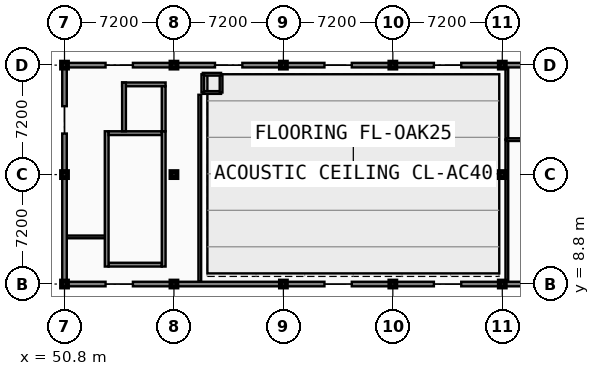
"""IFC4 building model, lengths in metres.
Left out: names, types, materials, properties, quantities, classifications, styles, units other than length and angle.
Written with IfcOpenShell. Run it as: python <this file> out.ifc"""

import sys

from ifc_helpers import new_model, si_unit, direction, frame, frame_2d, origin, origin_2d, place, context, subcontext, project, spatial, rectangle, extrude, element, fill, save


model = new_model("IFC4")
c1 = context("Model", 3, precision=1e-05, world=origin(), true_north=direction((0.0, 1.0)))
c2 = subcontext(c1, "Body", "Model", "MODEL_VIEW")
j1 = project(units=[si_unit("LENGTHUNIT", "METRE"), si_unit("PLANEANGLEUNIT", "RADIAN")], contexts=[c1])
p1 = place(None, origin())
s1 = spatial("IfcSite", under=j1, at=p1, CompositionType="ELEMENT")
p2 = place(p1, origin())
s2 = spatial("IfcBuilding", under=s1, at=p2, CompositionType="ELEMENT")
p3 = place(p2, frame((0.0, 0.0, 9.6)))
s3 = spatial("IfcBuildingStorey", under=s2, at=p3, CompositionType="ELEMENT", Elevation=9.6)
for number, where, z_axis, x_axis in (
    (1, (50.8, 8.8, 0.0), (0.0, 0.0, 1.0), (1.0, 0.0, 0.0)),
    (2, (50.8, 16.0, 0.0), (0.0, 0.0, 1.0), (1.0, 0.0, 0.0)),
    (3, (50.8, 23.2, 0.0), (0.0, 0.0, 1.0), (1.0, 0.0, 0.0)),
    (4, (58.0, 8.8, 0.0), (0.0, 0.0, 1.0), (1.0, 0.0, 0.0)),
    (5, (58.0, 16.0, 0.0), (0.0, 0.0, 1.0), (1.0, 0.0, 0.0)),
    (6, (58.0, 23.2, 0.0), (0.0, 0.0, 1.0), (1.0, 0.0, 0.0)),
    (7, (65.2, 8.8, 0.0), (0.0, 0.0, 1.0), (1.0, 0.0, 0.0)),
    (8, (65.2, 16.0, 0.0), (0.0, 0.0, 1.0), (1.0, 0.0, 0.0)),
    (9, (65.2, 23.2, 0.0), (0.0, 0.0, 1.0), (1.0, 0.0, 0.0)),
    (10, (72.4, 8.8, 0.0), (0.0, 0.0, 1.0), (1.0, 0.0, 0.0)),
    (11, (72.4, 16.0, 0.0), (0.0, 0.0, 1.0), (1.0, 0.0, 0.0)),
    (12, (72.4, 23.2, 0.0), (0.0, 0.0, 1.0), (1.0, 0.0, 0.0)),
    (13, (79.6, 8.8, 0.0), (0.0, 0.0, 1.0), (1.0, 0.0, 0.0)),
    (14, (79.6, 16.0, 0.0), (0.0, 0.0, 1.0), (1.0, 0.0, 0.0)),
    (15, (79.6, 23.2, 0.0), (0.0, 0.0, 1.0), (1.0, 0.0, 0.0)),
):
    element("IfcColumn", number, at=place(p3, frame(where, z_axis=z_axis, x_axis=x_axis)), inside=s3, PredefinedType="COLUMN", context=c2, shape_type="SweptSolid", body=[
        extrude(rectangle(XDim=0.4, YDim=0.4, at=origin_2d()), origin(), (0.0, 0.0, 1.0), 4.2),
    ])
p4 = place(p3, frame((50.94, 11.9, 0.0), z_axis=(0.0, 0.0, 1.0), x_axis=(1.0, 0.0, 0.0)))
e16 = element("IfcWall", 16, at=p4, inside=s3, PredefinedType="PARTITIONING", context=c2, shape_type="SweptSolid", body=[
    extrude(rectangle(XDim=2.66, YDim=0.18, at=frame_2d((1.33, 0.0))), origin(), (0.0, 0.0, 1.0), 3.45),
])
p5 = place(p4, frame((0.83, 0.0, -0.01)))
e17 = element("IfcOpeningElement", 17, at=p5, cuts=e16, PredefinedType="OPENING", context=c2, shape_type="SweptSolid", body=[
    extrude(rectangle(XDim=1.0, YDim=2.16, at=frame_2d((0.5, 1.08))), frame((0.0, 0.1, 0.0), z_axis=(0.0, -1.0, 0.0), x_axis=(1.0, 0.0, 0.0)), (0.0, 0.0, 1.0), 0.2),
])
p6 = place(p3, frame((59.7, 8.96, 0.0), z_axis=(0.0, 0.0, 1.0), x_axis=(0.0, 1.0, 0.0)))
e18 = element("IfcWall", 18, at=p6, inside=s3, PredefinedType="PARTITIONING", context=c2, shape_type="SweptSolid", body=[
    extrude(rectangle(XDim=12.29, YDim=0.18, at=frame_2d((6.145, 0.0))), origin(), (0.0, 0.0, 1.0), 3.37),
])
p7 = place(p6, frame((4.811, 0.0, -0.01)))
e19 = element("IfcOpeningElement", 19, at=p7, cuts=e18, PredefinedType="OPENING", context=c2, shape_type="SweptSolid", body=[
    extrude(rectangle(XDim=1.6, YDim=2.21, at=frame_2d((0.8, 1.105))), frame((0.0, 0.1, 0.0), z_axis=(0.0, -1.0, 0.0), x_axis=(1.0, 0.0, 0.0)), (0.0, 0.0, 1.0), 0.2),
])
p8 = place(p3, frame((79.9, 8.96, 0.0), z_axis=(0.0, 0.0, 1.0), x_axis=(0.0, 1.0, 0.0)))
e20 = element("IfcWall", 20, at=p8, inside=s3, PredefinedType="PARTITIONING", context=c2, shape_type="SweptSolid", body=[
    extrude(rectangle(XDim=9.34, YDim=0.18, at=frame_2d((4.67, 0.0))), origin(), (0.0, 0.0, 1.0), 3.33),
])
p9 = place(p8, frame((4.17, 0.0, -0.01)))
e21 = element("IfcOpeningElement", 21, at=p9, cuts=e20, PredefinedType="OPENING", context=c2, shape_type="SweptSolid", body=[
    extrude(rectangle(XDim=1.0, YDim=2.16, at=frame_2d((0.5, 1.08))), frame((0.0, 0.1, 0.0), z_axis=(0.0, -1.0, 0.0), x_axis=(1.0, 0.0, 0.0)), (0.0, 0.0, 1.0), 0.2),
])
p10 = place(p3, frame((79.9, 18.3, 0.0), z_axis=(0.0, 0.0, 1.0), x_axis=(0.0, 1.0, 0.0)))
e22 = element("IfcWall", 22, at=p10, inside=s3, PredefinedType="PARTITIONING", context=c2, shape_type="SweptSolid", body=[
    extrude(rectangle(XDim=4.76, YDim=0.18, at=frame_2d((2.38, 0.0))), origin(), (0.0, 0.0, 1.0), 3.33),
])
p11 = place(p10, frame((1.88, 0.0, -0.01)))
e23 = element("IfcOpeningElement", 23, at=p11, cuts=e22, PredefinedType="OPENING", context=c2, shape_type="SweptSolid", body=[
    extrude(rectangle(XDim=1.0, YDim=2.16, at=frame_2d((0.5, 1.08))), frame((0.0, 0.1, 0.0), z_axis=(0.0, -1.0, 0.0), x_axis=(1.0, 0.0, 0.0)), (0.0, 0.0, 1.0), 0.2),
])
p12 = place(p3, frame((79.9, 18.3, 0.0), z_axis=(0.0, 0.0, 1.0), x_axis=(1.0, 0.0, 0.0)))
e24 = element("IfcWall", 24, at=p12, inside=s3, PredefinedType="PARTITIONING", context=c2, shape_type="SweptSolid", body=[
    extrude(rectangle(XDim=6.76, YDim=0.18, at=frame_2d((3.38, 0.0))), origin(), (0.0, 0.0, 1.0), 3.41),
])
for number, where, z_axis, x_axis in (
    (25, (50.8, 8.8, 0.0), (0.0, 0.0, 1.0), (1.0, 0.0, 0.0)),
    (26, (55.3, 8.8, 0.0), (0.0, 0.0, 1.0), (1.0, 0.0, 0.0)),
):
    element("IfcWall", number, at=place(p3, frame(where, z_axis=z_axis, x_axis=x_axis)), inside=s3, PredefinedType="SOLIDWALL", context=c2, shape_type="SweptSolid", body=[
        extrude(rectangle(XDim=2.7, YDim=0.3, at=frame_2d((1.35, 0.0))), origin(), (0.0, 0.0, 1.0), 3.37),
    ])
p13 = place(p3, frame((58.0, 8.8, 0.0), z_axis=(0.0, 0.0, 1.0), x_axis=(1.0, 0.0, 0.0)))
e27 = element("IfcWall", 27, at=p13, inside=s3, PredefinedType="SOLIDWALL", context=c2, shape_type="SweptSolid", body=[
    extrude(rectangle(XDim=7.2, YDim=0.3, at=frame_2d((3.6, 0.0))), origin(), (0.0, 0.0, 1.0), 3.33),
])
p14 = place(p13, frame((0.46, 0.0, 0.85)))
e28 = element("IfcOpeningElement", 28, at=p14, cuts=e27, PredefinedType="OPENING", context=c2, shape_type="SweptSolid", body=[
    extrude(rectangle(XDim=0.9, YDim=2.1, at=frame_2d((0.45, 1.05))), frame((0.0, 0.16, 0.0), z_axis=(0.0, -1.0, 0.0), x_axis=(1.0, 0.0, 0.0)), (0.0, 0.0, 1.0), 0.32),
])
p15 = place(p13, frame((5.66, 0.0, 0.85)))
e29 = element("IfcOpeningElement", 29, at=p15, cuts=e27, PredefinedType="OPENING", context=c2, shape_type="SweptSolid", body=[
    extrude(rectangle(XDim=0.9, YDim=2.1, at=frame_2d((0.45, 1.05))), frame((0.0, 0.16, 0.0), z_axis=(0.0, -1.0, 0.0), x_axis=(1.0, 0.0, 0.0)), (0.0, 0.0, 1.0), 0.32),
])
for number, where, z_axis, x_axis in (
    (30, (65.2, 8.8, 0.0), (0.0, 0.0, 1.0), (1.0, 0.0, 0.0)),
    (31, (69.7, 8.8, 0.0), (0.0, 0.0, 1.0), (1.0, 0.0, 0.0)),
):
    element("IfcWall", number, at=place(p3, frame(where, z_axis=z_axis, x_axis=x_axis)), inside=s3, PredefinedType="SOLIDWALL", context=c2, shape_type="SweptSolid", body=[
        extrude(rectangle(XDim=2.7, YDim=0.3, at=frame_2d((1.35, 0.0))), origin(), (0.0, 0.0, 1.0), 3.33),
    ])
for number, where, z_axis, x_axis in (
    (32, (72.4, 8.8, 0.0), (0.0, 0.0, 1.0), (1.0, 0.0, 0.0)),
    (33, (76.9, 8.8, 0.0), (0.0, 0.0, 1.0), (1.0, 0.0, 0.0)),
):
    element("IfcWall", number, at=place(p3, frame(where, z_axis=z_axis, x_axis=x_axis)), inside=s3, PredefinedType="SOLIDWALL", context=c2, shape_type="SweptSolid", body=[
        extrude(rectangle(XDim=2.7, YDim=0.3, at=frame_2d((1.35, 0.0))), origin(), (0.0, 0.0, 1.0), 3.33),
    ])
p16 = place(p3, frame((79.6, 8.8, 0.0), z_axis=(0.0, 0.0, 1.0), x_axis=(1.0, 0.0, 0.0)))
e34 = element("IfcWall", 34, at=p16, inside=s3, PredefinedType="SOLIDWALL", context=c2, shape_type="SweptSolid", body=[
    extrude(rectangle(XDim=7.2, YDim=0.3, at=frame_2d((3.6, 0.0))), origin(), (0.0, 0.0, 1.0), 3.33),
])
p17 = place(p16, frame((0.66, 0.0, 0.85)))
e35 = element("IfcOpeningElement", 35, at=p17, cuts=e34, PredefinedType="OPENING", context=c2, shape_type="SweptSolid", body=[
    extrude(rectangle(XDim=0.9, YDim=2.1, at=frame_2d((0.45, 1.05))), frame((0.0, 0.16, 0.0), z_axis=(0.0, -1.0, 0.0), x_axis=(1.0, 0.0, 0.0)), (0.0, 0.0, 1.0), 0.32),
])
p18 = place(p16, frame((5.66, 0.0, 0.85)))
e36 = element("IfcOpeningElement", 36, at=p18, cuts=e34, PredefinedType="OPENING", context=c2, shape_type="SweptSolid", body=[
    extrude(rectangle(XDim=0.9, YDim=2.1, at=frame_2d((0.45, 1.05))), frame((0.0, 0.16, 0.0), z_axis=(0.0, -1.0, 0.0), x_axis=(1.0, 0.0, 0.0)), (0.0, 0.0, 1.0), 0.32),
])
for number, where, z_axis, x_axis in (
    (37, (58.0, 23.2, 0.0), (0.0, 0.0, 1.0), (-1.0, 0.0, 0.0)),
    (38, (53.5, 23.2, 0.0), (0.0, 0.0, 1.0), (-1.0, 0.0, 0.0)),
):
    element("IfcWall", number, at=place(p3, frame(where, z_axis=z_axis, x_axis=x_axis)), inside=s3, PredefinedType="SOLIDWALL", context=c2, shape_type="SweptSolid", body=[
        extrude(rectangle(XDim=2.7, YDim=0.3, at=frame_2d((1.35, 0.0))), origin(), (0.0, 0.0, 1.0), 3.37),
    ])
for number, where, z_axis, x_axis in (
    (39, (65.2, 23.2, 0.0), (0.0, 0.0, 1.0), (-1.0, 0.0, 0.0)),
    (40, (60.7, 23.2, 0.0), (0.0, 0.0, 1.0), (-1.0, 0.0, 0.0)),
    (41, (72.4, 23.2, 0.0), (0.0, 0.0, 1.0), (-1.0, 0.0, 0.0)),
    (42, (67.9, 23.2, 0.0), (0.0, 0.0, 1.0), (-1.0, 0.0, 0.0)),
):
    element("IfcWall", number, at=place(p3, frame(where, z_axis=z_axis, x_axis=x_axis)), inside=s3, PredefinedType="SOLIDWALL", context=c2, shape_type="SweptSolid", body=[
        extrude(rectangle(XDim=2.7, YDim=0.3, at=frame_2d((1.35, 0.0))), origin(), (0.0, 0.0, 1.0), 3.33),
    ])
for number, where, z_axis, x_axis in (
    (43, (79.6, 23.2, 0.0), (0.0, 0.0, 1.0), (-1.0, 0.0, 0.0)),
    (44, (75.1, 23.2, 0.0), (0.0, 0.0, 1.0), (-1.0, 0.0, 0.0)),
):
    element("IfcWall", number, at=place(p3, frame(where, z_axis=z_axis, x_axis=x_axis)), inside=s3, PredefinedType="SOLIDWALL", context=c2, shape_type="SweptSolid", body=[
        extrude(rectangle(XDim=2.7, YDim=0.3, at=frame_2d((1.35, 0.0))), origin(), (0.0, 0.0, 1.0), 3.33),
    ])
p19 = place(p3, frame((86.8, 23.2, 0.0), z_axis=(0.0, 0.0, 1.0), x_axis=(-1.0, 0.0, 0.0)))
e45 = element("IfcWall", 45, at=p19, inside=s3, PredefinedType="SOLIDWALL", context=c2, shape_type="SweptSolid", body=[
    extrude(rectangle(XDim=7.2, YDim=0.3, at=frame_2d((3.6, 0.0))), origin(), (0.0, 0.0, 1.0), 3.33),
])
p20 = place(p19, frame((0.46, 0.0, 0.85)))
e46 = element("IfcOpeningElement", 46, at=p20, cuts=e45, PredefinedType="OPENING", context=c2, shape_type="SweptSolid", body=[
    extrude(rectangle(XDim=0.9, YDim=2.1, at=frame_2d((0.45, 1.05))), frame((0.0, 0.16, 0.0), z_axis=(0.0, -1.0, 0.0), x_axis=(1.0, 0.0, 0.0)), (0.0, 0.0, 1.0), 0.32),
])
p21 = place(p19, frame((5.66, 0.0, 0.85)))
e47 = element("IfcOpeningElement", 47, at=p21, cuts=e45, PredefinedType="OPENING", context=c2, shape_type="SweptSolid", body=[
    extrude(rectangle(XDim=0.9, YDim=2.1, at=frame_2d((0.45, 1.05))), frame((0.0, 0.16, 0.0), z_axis=(0.0, -1.0, 0.0), x_axis=(1.0, 0.0, 0.0)), (0.0, 0.0, 1.0), 0.32),
])
p22 = place(p3, frame((50.8, 16.0, 0.0), z_axis=(0.0, 0.0, 1.0), x_axis=(0.0, -1.0, 0.0)))
e48 = element("IfcWall", 48, at=p22, inside=s3, PredefinedType="SOLIDWALL", context=c2, shape_type="SweptSolid", body=[
    extrude(rectangle(XDim=7.2, YDim=0.3, at=frame_2d((3.6, 0.0))), origin(), (0.0, 0.0, 1.0), 3.37),
])
p23 = place(p22, frame((0.46, 0.0, 0.85)))
e49 = element("IfcOpeningElement", 49, at=p23, cuts=e48, PredefinedType="OPENING", context=c2, shape_type="SweptSolid", body=[
    extrude(rectangle(XDim=0.9, YDim=2.1, at=frame_2d((0.45, 1.05))), frame((0.0, 0.16, 0.0), z_axis=(0.0, -1.0, 0.0), x_axis=(1.0, 0.0, 0.0)), (0.0, 0.0, 1.0), 0.32),
])
p24 = place(p22, frame((5.66, 0.0, 0.85)))
e50 = element("IfcOpeningElement", 50, at=p24, cuts=e48, PredefinedType="OPENING", context=c2, shape_type="SweptSolid", body=[
    extrude(rectangle(XDim=0.9, YDim=2.1, at=frame_2d((0.45, 1.05))), frame((0.0, 0.16, 0.0), z_axis=(0.0, -1.0, 0.0), x_axis=(1.0, 0.0, 0.0)), (0.0, 0.0, 1.0), 0.32),
])
for number, where, z_axis, x_axis in (
    (51, (50.8, 23.2, 0.0), (0.0, 0.0, 1.0), (0.0, -1.0, 0.0)),
    (52, (50.8, 18.7, 0.0), (0.0, 0.0, 1.0), (0.0, -1.0, 0.0)),
):
    element("IfcWall", number, at=place(p3, frame(where, z_axis=z_axis, x_axis=x_axis)), inside=s3, PredefinedType="SOLIDWALL", context=c2, shape_type="SweptSolid", body=[
        extrude(rectangle(XDim=2.7, YDim=0.3, at=frame_2d((1.35, 0.0))), origin(), (0.0, 0.0, 1.0), 3.37),
    ])
p25 = place(p3, frame((53.7, 10.075, 0.0), z_axis=(0.0, 0.0, 1.0), x_axis=(1.0, 0.0, 0.0)))
e53 = element("IfcWall", 53, at=p25, inside=s3, PredefinedType="SHEAR", context=c2, shape_type="SweptSolid", body=[
    extrude(rectangle(XDim=3.5, YDim=0.25, at=frame_2d((1.75, 0.0))), origin(), (0.0, 0.0, 1.0), 4.2),
])
p26 = place(p25, frame((1.1, 0.0, -0.01)))
e54 = element("IfcOpeningElement", 54, at=p26, cuts=e53, PredefinedType="OPENING", context=c2, shape_type="SweptSolid", body=[
    extrude(rectangle(XDim=1.3, YDim=2.16, at=frame_2d((0.65, 1.08))), frame((0.0, 0.135, 0.0), z_axis=(0.0, -1.0, 0.0), x_axis=(1.0, 0.0, 0.0)), (0.0, 0.0, 1.0), 0.27),
])
p27 = place(p3, frame((53.575, 9.95, 0.0), z_axis=(0.0, 0.0, 1.0), x_axis=(0.0, 1.0, 0.0)))
e55 = element("IfcWall", 55, at=p27, inside=s3, PredefinedType="SHEAR", context=c2, shape_type="SweptSolid", body=[
    extrude(rectangle(XDim=8.9, YDim=0.25, at=frame_2d((4.45, 0.0))), origin(), (0.0, 0.0, 1.0), 4.2),
])
p28 = place(p3, frame((57.2, 18.725, 0.0), z_axis=(0.0, 0.0, 1.0), x_axis=(-1.0, 0.0, 0.0)))
e56 = element("IfcWall", 56, at=p28, inside=s3, PredefinedType="SHEAR", context=c2, shape_type="SweptSolid", body=[
    extrude(rectangle(XDim=3.5, YDim=0.25, at=frame_2d((1.75, 0.0))), origin(), (0.0, 0.0, 1.0), 4.2),
])
p29 = place(p3, frame((57.325, 9.95, 0.0), z_axis=(0.0, 0.0, 1.0), x_axis=(0.0, 1.0, 0.0)))
e57 = element("IfcWall", 57, at=p29, inside=s3, PredefinedType="SHEAR", context=c2, shape_type="SweptSolid", body=[
    extrude(rectangle(XDim=8.9, YDim=0.25, at=frame_2d((4.45, 0.0))), origin(), (0.0, 0.0, 1.0), 4.2),
])
p30 = place(p3, frame((54.59, 21.935, 0.0), z_axis=(0.0, 0.0, 1.0), x_axis=(1.0, 0.0, 0.0)))
e58 = element("IfcWall", 58, at=p30, inside=s3, PredefinedType="SHEAR", context=c2, shape_type="SweptSolid", body=[
    extrude(rectangle(XDim=2.86, YDim=0.25, at=frame_2d((1.43, 0.0))), origin(), (0.0, 0.0, 1.0), 4.2),
])
p31 = place(p3, frame((57.325, 18.85, 0.0), z_axis=(0.0, 0.0, 1.0), x_axis=(0.0, 1.0, 0.0)))
e59 = element("IfcWall", 59, at=p31, inside=s3, PredefinedType="SHEAR", context=c2, shape_type="SweptSolid", body=[
    extrude(rectangle(XDim=2.96, YDim=0.25, at=frame_2d((1.48, 0.0))), origin(), (0.0, 0.0, 1.0), 4.2),
])
p32 = place(p31, frame((0.93, 0.0, -0.01)))
e60 = element("IfcOpeningElement", 60, at=p32, cuts=e59, PredefinedType="OPENING", context=c2, shape_type="SweptSolid", body=[
    extrude(rectangle(XDim=1.1, YDim=2.16, at=frame_2d((0.55, 1.08))), frame((0.0, 0.135, 0.0), z_axis=(0.0, -1.0, 0.0), x_axis=(1.0, 0.0, 0.0)), (0.0, 0.0, 1.0), 0.27),
])
p33 = place(p3, frame((54.715, 18.85, 0.0), z_axis=(0.0, 0.0, 1.0), x_axis=(0.0, 1.0, 0.0)))
e61 = element("IfcWall", 61, at=p33, inside=s3, PredefinedType="SHEAR", context=c2, shape_type="SweptSolid", body=[
    extrude(rectangle(XDim=3.21, YDim=0.25, at=frame_2d((1.605, 0.0))), origin(), (0.0, 0.0, 1.0), 4.2),
])
for number, where, z_axis, x_axis in (
    (62, (59.9, 21.4, 0.0), (0.0, 0.0, 1.0), (1.0, 0.0, 0.0)),
    (63, (61.1, 21.4, 0.0), (0.0, 0.0, 1.0), (0.0, 1.0, 0.0)),
    (64, (61.1, 22.6, 0.0), (0.0, 0.0, 1.0), (-1.0, 0.0, 0.0)),
):
    element("IfcWall", number, at=place(p3, frame(where, z_axis=z_axis, x_axis=x_axis)), inside=s3, PredefinedType="SOLIDWALL", context=c2, shape_type="SweptSolid", body=[
        extrude(rectangle(XDim=1.2, YDim=0.18, at=frame_2d((0.6, 0.0))), origin(), (0.0, 0.0, 1.0), 3.97),
    ])
p34 = place(p3, frame((59.9, 22.6, 0.0), z_axis=(0.0, 0.0, 1.0), x_axis=(0.0, -1.0, 0.0)))
e65 = element("IfcWall", 65, at=p34, inside=s3, PredefinedType="SOLIDWALL", context=c2, shape_type="SweptSolid", body=[
    extrude(rectangle(XDim=1.2, YDim=0.18, at=frame_2d((0.6, 0.0))), origin(), (0.0, 0.0, 1.0), 3.97),
])
p35 = place(p34, frame((0.2, 0.0, -0.01)))
e66 = element("IfcOpeningElement", 66, at=p35, cuts=e65, PredefinedType="OPENING", context=c2, shape_type="SweptSolid", body=[
    extrude(rectangle(XDim=0.8, YDim=2.06, at=frame_2d((0.4, 1.03))), frame((0.0, 0.1, 0.0), z_axis=(0.0, -1.0, 0.0), x_axis=(1.0, 0.0, 0.0)), (0.0, 0.0, 1.0), 0.2),
])
p36 = place(p5, frame((0.0, 0.0, 0.01)))
e67 = element("IfcDoor", 67, at=p36, inside=s3, OperationType="SINGLE_SWING_LEFT", PredefinedType="DOOR", context=c2, shape_type="SweptSolid", body=[
    extrude(rectangle(XDim=1.0, YDim=2.15, at=frame_2d((0.5, 1.075))), frame((0.0, 0.025, 0.0), z_axis=(0.0, -1.0, 0.0), x_axis=(1.0, 0.0, 0.0)), (0.0, 0.0, 1.0), 0.05),
])
fill(e17, e67)
p37 = place(p7, frame((0.0, 0.0, 0.01)))
e68 = element("IfcDoor", 68, at=p37, inside=s3, OperationType="DOUBLE_SWING_LEFT", PredefinedType="DOOR", context=c2, shape_type="SweptSolid", body=[
    extrude(rectangle(XDim=1.6, YDim=2.2, at=frame_2d((0.8, 1.1))), frame((0.0, 0.025, 0.0), z_axis=(0.0, -1.0, 0.0), x_axis=(1.0, 0.0, 0.0)), (0.0, 0.0, 1.0), 0.05),
])
fill(e19, e68)
p38 = place(p9, frame((1.0, 0.0, 0.01), z_axis=(0.0, 0.0, 1.0), x_axis=(-1.0, 0.0, 0.0)))
e69 = element("IfcDoor", 69, at=p38, inside=s3, OperationType="SINGLE_SWING_LEFT", PredefinedType="DOOR", context=c2, shape_type="SweptSolid", body=[
    extrude(rectangle(XDim=1.0, YDim=2.15, at=frame_2d((0.5, 1.075))), frame((0.0, 0.025, 0.0), z_axis=(0.0, -1.0, 0.0), x_axis=(1.0, 0.0, 0.0)), (0.0, 0.0, 1.0), 0.05),
])
fill(e21, e69)
p39 = place(p11, frame((0.0, 0.0, 0.01)))
e70 = element("IfcDoor", 70, at=p39, inside=s3, OperationType="SINGLE_SWING_RIGHT", PredefinedType="DOOR", context=c2, shape_type="SweptSolid", body=[
    extrude(rectangle(XDim=1.0, YDim=2.15, at=frame_2d((0.5, 1.075))), frame((0.0, 0.025, 0.0), z_axis=(0.0, -1.0, 0.0), x_axis=(1.0, 0.0, 0.0)), (0.0, 0.0, 1.0), 0.05),
])
fill(e23, e70)
p40 = place(p14, origin())
e71 = element("IfcWindow", 71, at=p40, inside=s3, PartitioningType="SINGLE_PANEL", PredefinedType="WINDOW", context=c2, shape_type="SweptSolid", body=[
    extrude(rectangle(XDim=0.9, YDim=2.1, at=frame_2d((0.45, 1.05))), frame((0.0, 0.03, 0.0), z_axis=(0.0, -1.0, 0.0), x_axis=(1.0, 0.0, 0.0)), (0.0, 0.0, 1.0), 0.06),
])
fill(e28, e71)
p41 = place(p15, origin())
e72 = element("IfcWindow", 72, at=p41, inside=s3, PartitioningType="SINGLE_PANEL", PredefinedType="WINDOW", context=c2, shape_type="SweptSolid", body=[
    extrude(rectangle(XDim=0.9, YDim=2.1, at=frame_2d((0.45, 1.05))), frame((0.0, 0.03, 0.0), z_axis=(0.0, -1.0, 0.0), x_axis=(1.0, 0.0, 0.0)), (0.0, 0.0, 1.0), 0.06),
])
fill(e29, e72)
p42 = place(p17, origin())
e73 = element("IfcWindow", 73, at=p42, inside=s3, PartitioningType="SINGLE_PANEL", PredefinedType="WINDOW", context=c2, shape_type="SweptSolid", body=[
    extrude(rectangle(XDim=0.9, YDim=2.1, at=frame_2d((0.45, 1.05))), frame((0.0, 0.03, 0.0), z_axis=(0.0, -1.0, 0.0), x_axis=(1.0, 0.0, 0.0)), (0.0, 0.0, 1.0), 0.06),
])
fill(e35, e73)
p43 = place(p21, origin())
e74 = element("IfcWindow", 74, at=p43, inside=s3, PartitioningType="SINGLE_PANEL", PredefinedType="WINDOW", context=c2, shape_type="SweptSolid", body=[
    extrude(rectangle(XDim=0.9, YDim=2.1, at=frame_2d((0.45, 1.05))), frame((0.0, 0.03, 0.0), z_axis=(0.0, -1.0, 0.0), x_axis=(1.0, 0.0, 0.0)), (0.0, 0.0, 1.0), 0.06),
])
fill(e47, e74)
p44 = place(p23, origin())
e75 = element("IfcWindow", 75, at=p44, inside=s3, PartitioningType="SINGLE_PANEL", PredefinedType="WINDOW", context=c2, shape_type="SweptSolid", body=[
    extrude(rectangle(XDim=0.9, YDim=2.1, at=frame_2d((0.45, 1.05))), frame((0.0, 0.03, 0.0), z_axis=(0.0, -1.0, 0.0), x_axis=(1.0, 0.0, 0.0)), (0.0, 0.0, 1.0), 0.06),
])
fill(e49, e75)
p45 = place(p24, origin())
e76 = element("IfcWindow", 76, at=p45, inside=s3, PartitioningType="SINGLE_PANEL", PredefinedType="WINDOW", context=c2, shape_type="SweptSolid", body=[
    extrude(rectangle(XDim=0.9, YDim=2.1, at=frame_2d((0.45, 1.05))), frame((0.0, 0.03, 0.0), z_axis=(0.0, -1.0, 0.0), x_axis=(1.0, 0.0, 0.0)), (0.0, 0.0, 1.0), 0.06),
])
fill(e50, e76)
p46 = place(p26, frame((0.0, 0.0, 0.01)))
e77 = element("IfcDoor", 77, at=p46, inside=s3, OperationType="SINGLE_SWING_RIGHT", PredefinedType="DOOR", context=c2, shape_type="SweptSolid", body=[
    extrude(rectangle(XDim=1.3, YDim=2.15, at=frame_2d((0.65, 1.075))), frame((0.0, 0.025, 0.0), z_axis=(0.0, -1.0, 0.0), x_axis=(1.0, 0.0, 0.0)), (0.0, 0.0, 1.0), 0.05),
])
fill(e54, e77)
p47 = place(p32, frame((0.0, 0.0, 0.01)))
e78 = element("IfcDoor", 78, at=p47, inside=s3, OperationType="SLIDING_TO_LEFT", PredefinedType="DOOR", context=c2, shape_type="SweptSolid", body=[
    extrude(rectangle(XDim=1.1, YDim=2.15, at=frame_2d((0.55, 1.075))), frame((0.0, 0.025, 0.0), z_axis=(0.0, -1.0, 0.0), x_axis=(1.0, 0.0, 0.0)), (0.0, 0.0, 1.0), 0.05),
])
fill(e60, e78)
p48 = place(p35, frame((0.0, 0.0, 0.01)))
e79 = element("IfcDoor", 79, at=p48, inside=s3, OperationType="SINGLE_SWING_RIGHT", PredefinedType="DOOR", context=c2, shape_type="SweptSolid", body=[
    extrude(rectangle(XDim=0.8, YDim=2.05, at=frame_2d((0.4, 1.025))), frame((0.0, 0.025, 0.0), z_axis=(0.0, -1.0, 0.0), x_axis=(1.0, 0.0, 0.0)), (0.0, 0.0, 1.0), 0.05),
])
fill(e66, e79)
save(model, sys.argv[1])
